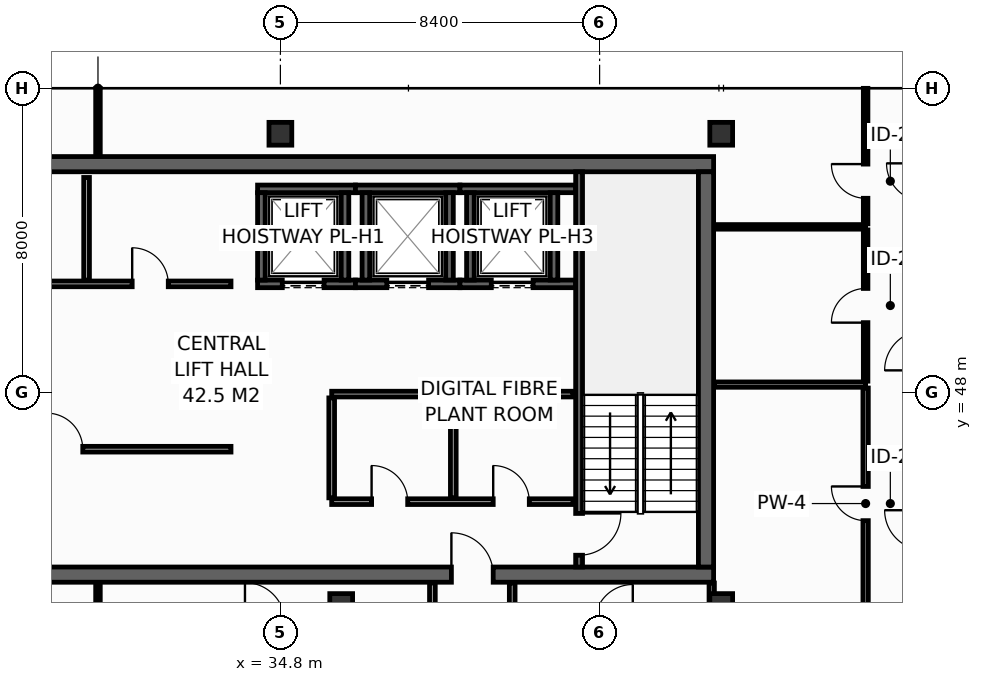
"""IFC4 building model, lengths in metres.
Left out: names, types, materials, properties, quantities, classifications, styles, units other than length and angle.
Written with IfcOpenShell. Run it as: python <this file> out.ifc"""

import sys

from ifc_helpers import new_model, si_unit, direction, frame, frame_2d, origin, origin_2d, place, context, subcontext, project, spatial, rectangle, hollow_rectangle, extrude, element, fill, save


model = new_model("IFC4")
c1 = context("Model", 3, precision=1e-05, world=origin(), true_north=direction((0.0, 1.0)))
c2 = subcontext(c1, "Body", "Model", "MODEL_VIEW")
j1 = project(units=[si_unit("LENGTHUNIT", "METRE"), si_unit("PLANEANGLEUNIT", "RADIAN")], contexts=[c1])
p1 = place(None, origin())
s1 = spatial("IfcSite", under=j1, at=p1, CompositionType="ELEMENT")
p2 = place(p1, origin())
s2 = spatial("IfcBuilding", under=s1, at=p2, CompositionType="ELEMENT")
p3 = place(p2, frame((0.0, 0.0, 319.2)))
s3 = spatial("IfcBuildingStorey", under=s2, at=p3, CompositionType="ELEMENT", Elevation=319.2)
p4 = place(p3, frame((13.7, 43.2, 0.0), z_axis=(0.0, 0.0, 1.0), x_axis=(1.0, 0.0, 0.0)))
e1 = element("IfcWall", 1, at=p4, inside=s3, PredefinedType="SHEAR", context=c2, shape_type="SweptSolid", body=[
    extrude(rectangle(XDim=32.5, YDim=0.4, at=frame_2d((16.25, 0.0))), origin(), (0.0, 0.0, 1.0), 3.95),
])
p5 = place(p4, frame((5.4, 0.0, 0.0)))
e2 = element("IfcOpeningElement", 2, at=p5, cuts=e1, PredefinedType="OPENING", context=c2, shape_type="SweptSolid", body=[
    extrude(rectangle(XDim=1.1, YDim=2.15, at=frame_2d((0.55, 1.075))), frame((0.0, 0.21, 0.0), z_axis=(0.0, -1.0, 0.0), x_axis=(1.0, 0.0, 0.0)), (0.0, 0.0, 1.0), 0.42),
])
p6 = place(p4, frame((25.6, 0.0, 0.0)))
e3 = element("IfcOpeningElement", 3, at=p6, cuts=e1, PredefinedType="OPENING", context=c2, shape_type="SweptSolid", body=[
    extrude(rectangle(XDim=1.1, YDim=2.15, at=frame_2d((0.55, 1.075))), frame((0.0, 0.21, 0.0), z_axis=(0.0, -1.0, 0.0), x_axis=(1.0, 0.0, 0.0)), (0.0, 0.0, 1.0), 0.42),
])
p7 = place(p3, frame((13.7, 54.0, 0.0), z_axis=(0.0, 0.0, 1.0), x_axis=(1.0, 0.0, 0.0)))
e4 = element("IfcWall", 4, at=p7, inside=s3, PredefinedType="SHEAR", context=c2, shape_type="SweptSolid", body=[
    extrude(rectangle(XDim=32.5, YDim=0.4, at=frame_2d((16.25, 0.0))), origin(), (0.0, 0.0, 1.0), 3.95),
])
p8 = place(p3, frame((46.0, 43.4, 0.0), z_axis=(0.0, 0.0, 1.0), x_axis=(0.0, 1.0, 0.0)))
e5 = element("IfcWall", 5, at=p8, inside=s3, PredefinedType="SHEAR", context=c2, shape_type="SweptSolid", body=[
    extrude(rectangle(XDim=10.4, YDim=0.4, at=frame_2d((5.2, 0.0))), origin(), (0.0, 0.0, 1.0), 3.95),
])
for number, where, z_axis, x_axis in (
    (6, (34.8, 54.8, 0.0), (0.0, 0.0, 1.0), (1.0, 0.0, 0.0)),
    (7, (46.4, 54.8, 0.0), (0.0, 0.0, 1.0), (1.0, 0.0, 0.0)),
    (8, (36.4, 42.4, 0.0), (0.0, 0.0, 1.0), (1.0, 0.0, 0.0)),
    (9, (46.4, 42.4, 0.0), (0.0, 0.0, 1.0), (1.0, 0.0, 0.0)),
):
    element("IfcColumn", number, at=place(p3, frame(where, z_axis=z_axis, x_axis=x_axis)), inside=s3, PredefinedType="COLUMN", context=c2, shape_type="SweptSolid", body=[
        extrude(hollow_rectangle(XDim=0.6, YDim=0.6, WallThickness=0.028, at=origin_2d()), origin(), (0.0, 0.0, 1.0), 4.2),
    ])
p9 = place(p3, frame((34.2, 50.85, 0.0), z_axis=(0.0, 0.0, 1.0), x_axis=(1.0, 0.0, 0.0)))
e10 = element("IfcWall", 10, at=p9, inside=s3, PredefinedType="SHEAR", context=c2, shape_type="SweptSolid", body=[
    extrude(rectangle(XDim=2.575, YDim=0.2, at=frame_2d((1.288, 0.0))), origin(), (0.0, 0.0, 1.0), 3.95),
])
p10 = place(p9, frame((0.65, 0.0, 0.0)))
e11 = element("IfcOpeningElement", 11, at=p10, cuts=e10, PredefinedType="OPENING", context=c2, shape_type="SweptSolid", body=[
    extrude(rectangle(XDim=1.1, YDim=2.2, at=frame_2d((0.55, 1.1))), frame((0.0, 0.11, 0.0), z_axis=(0.0, -1.0, 0.0), x_axis=(1.0, 0.0, 0.0)), (0.0, 0.0, 1.0), 0.22),
])
p11 = place(p3, frame((34.2, 53.35, 0.0), z_axis=(0.0, 0.0, 1.0), x_axis=(1.0, 0.0, 0.0)))
e12 = element("IfcWall", 12, at=p11, inside=s3, PredefinedType="SHEAR", context=c2, shape_type="SweptSolid", body=[
    extrude(rectangle(XDim=2.575, YDim=0.2, at=frame_2d((1.288, 0.0))), origin(), (0.0, 0.0, 1.0), 3.95),
])
for number, where, z_axis, x_axis in (
    (13, (34.3, 50.95, 0.0), (0.0, 0.0, 1.0), (0.0, 1.0, 0.0)),
    (14, (36.5, 50.95, 0.0), (0.0, 0.0, 1.0), (0.0, 1.0, 0.0)),
):
    element("IfcWall", number, at=place(p3, frame(where, z_axis=z_axis, x_axis=x_axis)), inside=s3, PredefinedType="SHEAR", context=c2, shape_type="SweptSolid", body=[
        extrude(rectangle(XDim=2.3, YDim=0.2, at=frame_2d((1.15, 0.0))), origin(), (0.0, 0.0, 1.0), 3.95),
    ])
p12 = place(p3, frame((36.775, 50.85, 0.0), z_axis=(0.0, 0.0, 1.0), x_axis=(1.0, 0.0, 0.0)))
e15 = element("IfcWall", 15, at=p12, inside=s3, PredefinedType="SHEAR", context=c2, shape_type="SweptSolid", body=[
    extrude(rectangle(XDim=2.75, YDim=0.2, at=frame_2d((1.375, 0.0))), origin(), (0.0, 0.0, 1.0), 3.95),
])
p13 = place(p12, frame((0.825, 0.0, 0.0)))
e16 = element("IfcOpeningElement", 16, at=p13, cuts=e15, PredefinedType="OPENING", context=c2, shape_type="SweptSolid", body=[
    extrude(rectangle(XDim=1.1, YDim=2.2, at=frame_2d((0.55, 1.1))), frame((0.0, 0.11, 0.0), z_axis=(0.0, -1.0, 0.0), x_axis=(1.0, 0.0, 0.0)), (0.0, 0.0, 1.0), 0.22),
])
p14 = place(p3, frame((36.775, 53.35, 0.0), z_axis=(0.0, 0.0, 1.0), x_axis=(1.0, 0.0, 0.0)))
e17 = element("IfcWall", 17, at=p14, inside=s3, PredefinedType="SHEAR", context=c2, shape_type="SweptSolid", body=[
    extrude(rectangle(XDim=2.75, YDim=0.2, at=frame_2d((1.375, 0.0))), origin(), (0.0, 0.0, 1.0), 3.95),
])
for number, where, z_axis, x_axis in (
    (18, (37.05, 50.95, 0.0), (0.0, 0.0, 1.0), (0.0, 1.0, 0.0)),
    (19, (39.25, 50.95, 0.0), (0.0, 0.0, 1.0), (0.0, 1.0, 0.0)),
):
    element("IfcWall", number, at=place(p3, frame(where, z_axis=z_axis, x_axis=x_axis)), inside=s3, PredefinedType="SHEAR", context=c2, shape_type="SweptSolid", body=[
        extrude(rectangle(XDim=2.3, YDim=0.2, at=frame_2d((1.15, 0.0))), origin(), (0.0, 0.0, 1.0), 3.95),
    ])
p15 = place(p3, frame((39.525, 50.85, 0.0), z_axis=(0.0, 0.0, 1.0), x_axis=(1.0, 0.0, 0.0)))
e20 = element("IfcWall", 20, at=p15, inside=s3, PredefinedType="SHEAR", context=c2, shape_type="SweptSolid", body=[
    extrude(rectangle(XDim=3.045, YDim=0.2, at=frame_2d((1.522, 0.0))), origin(), (0.0, 0.0, 1.0), 3.95),
])
p16 = place(p15, frame((0.825, 0.0, 0.0)))
e21 = element("IfcOpeningElement", 21, at=p16, cuts=e20, PredefinedType="OPENING", context=c2, shape_type="SweptSolid", body=[
    extrude(rectangle(XDim=1.1, YDim=2.2, at=frame_2d((0.55, 1.1))), frame((0.0, 0.11, 0.0), z_axis=(0.0, -1.0, 0.0), x_axis=(1.0, 0.0, 0.0)), (0.0, 0.0, 1.0), 0.22),
])
p17 = place(p3, frame((39.525, 53.35, 0.0), z_axis=(0.0, 0.0, 1.0), x_axis=(1.0, 0.0, 0.0)))
e22 = element("IfcWall", 22, at=p17, inside=s3, PredefinedType="SHEAR", context=c2, shape_type="SweptSolid", body=[
    extrude(rectangle(XDim=3.045, YDim=0.2, at=frame_2d((1.522, 0.0))), origin(), (0.0, 0.0, 1.0), 3.95),
])
for number, where, z_axis, x_axis in (
    (23, (39.8, 50.95, 0.0), (0.0, 0.0, 1.0), (0.0, 1.0, 0.0)),
    (24, (42.0, 50.95, 0.0), (0.0, 0.0, 1.0), (0.0, 1.0, 0.0)),
):
    element("IfcWall", number, at=place(p3, frame(where, z_axis=z_axis, x_axis=x_axis)), inside=s3, PredefinedType="SHEAR", context=c2, shape_type="SweptSolid", body=[
        extrude(rectangle(XDim=2.3, YDim=0.2, at=frame_2d((1.15, 0.0))), origin(), (0.0, 0.0, 1.0), 3.95),
    ])
p18 = place(p3, frame((42.66, 53.8, 0.0), z_axis=(0.0, 0.0, 1.0), x_axis=(0.0, -1.0, 0.0)))
e25 = element("IfcWall", 25, at=p18, inside=s3, PredefinedType="SHEAR", context=c2, shape_type="SweptSolid", body=[
    extrude(rectangle(XDim=10.4, YDim=0.18, at=frame_2d((5.2, 0.0))), origin(), (0.0, 0.0, 1.0), 3.95),
])
p19 = place(p18, frame((8.99, 0.0, 0.0)))
e26 = element("IfcOpeningElement", 26, at=p19, cuts=e25, PredefinedType="OPENING", context=c2, shape_type="SweptSolid", body=[
    extrude(rectangle(XDim=1.1, YDim=2.15, at=frame_2d((0.55, 1.075))), frame((0.0, 0.1, 0.0), z_axis=(0.0, -1.0, 0.0), x_axis=(1.0, 0.0, 0.0)), (0.0, 0.0, 1.0), 0.2),
])
p20 = place(p3, frame((36.15, 45.12, 0.0), z_axis=(0.0, 0.0, 1.0), x_axis=(1.0, 0.0, 0.0)))
e27 = element("IfcWall", 27, at=p20, inside=s3, PredefinedType="PARTITIONING", context=c2, shape_type="SweptSolid", body=[
    extrude(rectangle(XDim=6.35, YDim=0.15, at=frame_2d((3.175, 0.0))), origin(), (0.0, 0.0, 1.0), 3.95),
])
p21 = place(p20, frame((1.05, 0.0, 0.0)))
e28 = element("IfcOpeningElement", 28, at=p21, cuts=e27, PredefinedType="OPENING", context=c2, shape_type="SweptSolid", body=[
    extrude(rectangle(XDim=0.95, YDim=2.15, at=frame_2d((0.475, 1.075))), frame((0.0, 0.085, 0.0), z_axis=(0.0, -1.0, 0.0), x_axis=(1.0, 0.0, 0.0)), (0.0, 0.0, 1.0), 0.17),
])
p22 = place(p20, frame((4.25, 0.0, 0.0)))
e29 = element("IfcOpeningElement", 29, at=p22, cuts=e27, PredefinedType="OPENING", context=c2, shape_type="SweptSolid", body=[
    extrude(rectangle(XDim=0.95, YDim=2.15, at=frame_2d((0.475, 1.075))), frame((0.0, 0.085, 0.0), z_axis=(0.0, -1.0, 0.0), x_axis=(1.0, 0.0, 0.0)), (0.0, 0.0, 1.0), 0.17),
])
p23 = place(p3, frame((36.15, 47.95, 0.0), z_axis=(0.0, 0.0, 1.0), x_axis=(1.0, 0.0, 0.0)))
e30 = element("IfcWall", 30, at=p23, inside=s3, PredefinedType="PARTITIONING", context=c2, shape_type="SweptSolid", body=[
    extrude(rectangle(XDim=6.35, YDim=0.15, at=frame_2d((3.175, 0.0))), origin(), (0.0, 0.0, 1.0), 3.95),
])
for number, where, z_axis, x_axis in (
    (31, (36.15, 45.22, 0.0), (0.0, 0.0, 1.0), (0.0, 1.0, 0.0)),
    (32, (39.35, 45.22, 0.0), (0.0, 0.0, 1.0), (0.0, 1.0, 0.0)),
):
    element("IfcWall", number, at=place(p3, frame(where, z_axis=z_axis, x_axis=x_axis)), inside=s3, PredefinedType="PARTITIONING", context=c2, shape_type="SweptSolid", body=[
        extrude(rectangle(XDim=2.63, YDim=0.15, at=frame_2d((1.315, 0.0))), origin(), (0.0, 0.0, 1.0), 3.95),
    ])
p24 = place(p3, frame((25.85, 50.85, 0.0), z_axis=(0.0, 0.0, 1.0), x_axis=(1.0, 0.0, 0.0)))
e33 = element("IfcWall", 33, at=p24, inside=s3, PredefinedType="PARTITIONING", context=c2, shape_type="SweptSolid", body=[
    extrude(rectangle(XDim=7.65, YDim=0.15, at=frame_2d((3.825, 0.0))), origin(), (0.0, 0.0, 1.0), 3.95),
])
p25 = place(p24, frame((1.25, 0.0, 0.0)))
e34 = element("IfcOpeningElement", 34, at=p25, cuts=e33, PredefinedType="OPENING", context=c2, shape_type="SweptSolid", body=[
    extrude(rectangle(XDim=0.95, YDim=2.15, at=frame_2d((0.475, 1.075))), frame((0.0, 0.085, 0.0), z_axis=(0.0, -1.0, 0.0), x_axis=(1.0, 0.0, 0.0)), (0.0, 0.0, 1.0), 0.17),
])
p26 = place(p24, frame((5.05, 0.0, 0.0)))
e35 = element("IfcOpeningElement", 35, at=p26, cuts=e33, PredefinedType="OPENING", context=c2, shape_type="SweptSolid", body=[
    extrude(rectangle(XDim=0.95, YDim=2.15, at=frame_2d((0.475, 1.075))), frame((0.0, 0.085, 0.0), z_axis=(0.0, -1.0, 0.0), x_axis=(1.0, 0.0, 0.0)), (0.0, 0.0, 1.0), 0.17),
])
p27 = place(p3, frame((29.7, 50.95, 0.0), z_axis=(0.0, 0.0, 1.0), x_axis=(0.0, 1.0, 0.0)))
e36 = element("IfcWall", 36, at=p27, inside=s3, PredefinedType="PARTITIONING", context=c2, shape_type="SweptSolid", body=[
    extrude(rectangle(XDim=2.7, YDim=0.15, at=frame_2d((1.35, 0.0))), origin(), (0.0, 0.0, 1.0), 3.95),
])
p28 = place(p3, frame((25.85, 46.5, 0.0), z_axis=(0.0, 0.0, 1.0), x_axis=(1.0, 0.0, 0.0)))
e37 = element("IfcWall", 37, at=p28, inside=s3, PredefinedType="PARTITIONING", context=c2, shape_type="SweptSolid", body=[
    extrude(rectangle(XDim=7.65, YDim=0.15, at=frame_2d((3.825, 0.0))), origin(), (0.0, 0.0, 1.0), 3.95),
])
p29 = place(p28, frame((2.8, 0.0, 0.0)))
e38 = element("IfcOpeningElement", 38, at=p29, cuts=e37, PredefinedType="OPENING", context=c2, shape_type="SweptSolid", body=[
    extrude(rectangle(XDim=0.95, YDim=2.15, at=frame_2d((0.475, 1.075))), frame((0.0, 0.085, 0.0), z_axis=(0.0, -1.0, 0.0), x_axis=(1.0, 0.0, 0.0)), (0.0, 0.0, 1.0), 0.17),
])
p30 = place(p3, frame((46.15, 42.03, 0.0), z_axis=(0.0, 0.0, 1.0), x_axis=(0.0, 1.0, 0.0)))
e39 = element("IfcWall", 39, at=p30, inside=s3, PredefinedType="PARTITIONING", context=c2, shape_type="SweptSolid", body=[
    extrude(rectangle(XDim=0.95, YDim=0.14, at=frame_2d((0.475, 0.0))), origin(), (0.0, 0.0, 1.0), 3.95),
])
p31 = place(p3, frame((46.22, 48.2, 0.0), z_axis=(0.0, 0.0, 1.0), x_axis=(1.0, 0.0, 0.0)))
e40 = element("IfcWall", 40, at=p31, inside=s3, PredefinedType="PARTITIONING", context=c2, shape_type="SweptSolid", body=[
    extrude(rectangle(XDim=3.98, YDim=0.14, at=frame_2d((1.99, 0.0))), origin(), (0.0, 0.0, 1.0), 3.95),
])
p32 = place(p3, frame((50.2, 42.03, 0.0), z_axis=(0.0, 0.0, 1.0), x_axis=(0.0, 1.0, 0.0)))
e41 = element("IfcWall", 41, at=p32, inside=s3, PredefinedType="PARTITIONING", context=c2, shape_type="SweptSolid", body=[
    extrude(rectangle(XDim=6.08, YDim=0.14, at=frame_2d((3.04, 0.0))), origin(), (0.0, 0.0, 1.0), 3.347),
])
p33 = place(p32, frame((2.59, 0.0, 0.0)))
e42 = element("IfcOpeningElement", 42, at=p33, cuts=e41, PredefinedType="OPENING", context=c2, shape_type="SweptSolid", body=[
    extrude(rectangle(XDim=0.9, YDim=2.1, at=frame_2d((0.45, 1.05))), frame((0.0, 0.08, 0.0), z_axis=(0.0, -1.0, 0.0), x_axis=(1.0, 0.0, 0.0)), (0.0, 0.0, 1.0), 0.16),
])
p34 = place(p3, frame((46.22, 52.35, 0.0), z_axis=(0.0, 0.0, 1.0), x_axis=(1.0, 0.0, 0.0)))
e43 = element("IfcWall", 43, at=p34, inside=s3, PredefinedType="PARTITIONING", context=c2, shape_type="SweptSolid", body=[
    extrude(rectangle(XDim=3.98, YDim=0.12, at=frame_2d((1.99, 0.0))), origin(), (0.0, 0.0, 1.0), 3.95),
])
p35 = place(p3, frame((30.0, 54.22, 0.0), z_axis=(0.0, 0.0, 1.0), x_axis=(0.0, 1.0, 0.0)))
e44 = element("IfcWall", 44, at=p35, inside=s3, PredefinedType="PARTITIONING", context=c2, shape_type="SweptSolid", body=[
    extrude(rectangle(XDim=1.775, YDim=0.12, at=frame_2d((0.888, 0.0))), origin(), (0.0, 0.0, 1.0), 3.335),
])
p36 = place(p3, frame((50.2, 48.29, 0.0), z_axis=(0.0, 0.0, 1.0), x_axis=(0.0, 1.0, 0.0)))
e45 = element("IfcWall", 45, at=p36, inside=s3, PredefinedType="PARTITIONING", context=c2, shape_type="SweptSolid", body=[
    extrude(rectangle(XDim=3.98, YDim=0.12, at=frame_2d((1.99, 0.0))), origin(), (0.0, 0.0, 1.0), 3.95),
])
p37 = place(p36, frame((1.54, 0.0, 0.0)))
e46 = element("IfcOpeningElement", 46, at=p37, cuts=e45, PredefinedType="OPENING", context=c2, shape_type="SweptSolid", body=[
    extrude(rectangle(XDim=0.9, YDim=2.1, at=frame_2d((0.45, 1.05))), frame((0.0, 0.07, 0.0), z_axis=(0.0, -1.0, 0.0), x_axis=(1.0, 0.0, 0.0)), (0.0, 0.0, 1.0), 0.14),
])
p38 = place(p3, frame((50.2, 52.43, 0.0), z_axis=(0.0, 0.0, 1.0), x_axis=(0.0, 1.0, 0.0)))
e47 = element("IfcWall", 47, at=p38, inside=s3, PredefinedType="PARTITIONING", context=c2, shape_type="SweptSolid", body=[
    extrude(rectangle(XDim=3.565, YDim=0.12, at=frame_2d((1.783, 0.0))), origin(), (0.0, 0.0, 1.0), 3.335),
])
p39 = place(p38, frame((0.672, 0.0, 0.0)))
e48 = element("IfcOpeningElement", 48, at=p39, cuts=e47, PredefinedType="OPENING", context=c2, shape_type="SweptSolid", body=[
    extrude(rectangle(XDim=0.9, YDim=2.1, at=frame_2d((0.45, 1.05))), frame((0.0, 0.07, 0.0), z_axis=(0.0, -1.0, 0.0), x_axis=(1.0, 0.0, 0.0)), (0.0, 0.0, 1.0), 0.14),
])
for number, where, z_axis, x_axis in (
    (49, (38.8, 41.94, 0.0), (0.0, 0.0, 1.0), (0.0, 1.0, 0.0)),
    (50, (40.9, 41.94, 0.0), (0.0, 0.0, 1.0), (0.0, 1.0, 0.0)),
):
    element("IfcWall", number, at=place(p3, frame(where, z_axis=z_axis, x_axis=x_axis)), inside=s3, PredefinedType="PARTITIONING", context=c2, shape_type="SweptSolid", body=[
        extrude(rectangle(XDim=1.04, YDim=0.15, at=frame_2d((0.52, 0.0))), origin(), (0.0, 0.0, 1.0), 3.95),
    ])
p40 = place(p3, frame((30.0, 41.94, 0.0), z_axis=(0.0, 0.0, 1.0), x_axis=(0.0, 1.0, 0.0)))
e51 = element("IfcWall", 51, at=p40, inside=s3, PredefinedType="PARTITIONING", context=c2, shape_type="SweptSolid", body=[
    extrude(rectangle(XDim=1.04, YDim=0.12, at=frame_2d((0.52, 0.0))), origin(), (0.0, 0.0, 1.0), 3.347),
])
p41 = place(p10, origin())
e52 = element("IfcDoor", 52, at=p41, inside=s3, OperationType="SLIDING_TO_LEFT", PredefinedType="DOOR", context=c2, shape_type="SweptSolid", body=[
    extrude(rectangle(XDim=1.1, YDim=2.2, at=frame_2d((0.55, 1.1))), frame((0.0, 0.025, 0.0), z_axis=(0.0, -1.0, 0.0), x_axis=(1.0, 0.0, 0.0)), (0.0, 0.0, 1.0), 0.05),
])
fill(e11, e52)
p42 = place(p13, origin())
e53 = element("IfcDoor", 53, at=p42, inside=s3, OperationType="SLIDING_TO_LEFT", PredefinedType="DOOR", context=c2, shape_type="SweptSolid", body=[
    extrude(rectangle(XDim=1.1, YDim=2.2, at=frame_2d((0.55, 1.1))), frame((0.0, 0.025, 0.0), z_axis=(0.0, -1.0, 0.0), x_axis=(1.0, 0.0, 0.0)), (0.0, 0.0, 1.0), 0.05),
])
fill(e16, e53)
p43 = place(p16, origin())
e54 = element("IfcDoor", 54, at=p43, inside=s3, OperationType="SLIDING_TO_LEFT", PredefinedType="DOOR", context=c2, shape_type="SweptSolid", body=[
    extrude(rectangle(XDim=1.1, YDim=2.2, at=frame_2d((0.55, 1.1))), frame((0.0, 0.025, 0.0), z_axis=(0.0, -1.0, 0.0), x_axis=(1.0, 0.0, 0.0)), (0.0, 0.0, 1.0), 0.05),
])
fill(e21, e54)
p44 = place(p19, origin())
e55 = element("IfcDoor", 55, at=p44, inside=s3, OperationType="SINGLE_SWING_LEFT", PredefinedType="DOOR", context=c2, shape_type="SweptSolid", body=[
    extrude(rectangle(XDim=1.1, YDim=2.15, at=frame_2d((0.55, 1.075))), frame((0.0, 0.025, 0.0), z_axis=(0.0, -1.0, 0.0), x_axis=(1.0, 0.0, 0.0)), (0.0, 0.0, 1.0), 0.05),
])
fill(e26, e55)
p45 = place(p6, origin())
e56 = element("IfcDoor", 56, at=p45, inside=s3, OperationType="SINGLE_SWING_LEFT", PredefinedType="DOOR", context=c2, shape_type="SweptSolid", body=[
    extrude(rectangle(XDim=1.1, YDim=2.15, at=frame_2d((0.55, 1.075))), frame((0.0, 0.025, 0.0), z_axis=(0.0, -1.0, 0.0), x_axis=(1.0, 0.0, 0.0)), (0.0, 0.0, 1.0), 0.05),
])
fill(e3, e56)
p46 = place(p21, origin())
e57 = element("IfcDoor", 57, at=p46, inside=s3, OperationType="SINGLE_SWING_LEFT", PredefinedType="DOOR", context=c2, shape_type="SweptSolid", body=[
    extrude(rectangle(XDim=0.95, YDim=2.15, at=frame_2d((0.475, 1.075))), frame((0.0, 0.025, 0.0), z_axis=(0.0, -1.0, 0.0), x_axis=(1.0, 0.0, 0.0)), (0.0, 0.0, 1.0), 0.05),
])
fill(e28, e57)
p47 = place(p22, origin())
e58 = element("IfcDoor", 58, at=p47, inside=s3, OperationType="SINGLE_SWING_LEFT", PredefinedType="DOOR", context=c2, shape_type="SweptSolid", body=[
    extrude(rectangle(XDim=0.95, YDim=2.15, at=frame_2d((0.475, 1.075))), frame((0.0, 0.025, 0.0), z_axis=(0.0, -1.0, 0.0), x_axis=(1.0, 0.0, 0.0)), (0.0, 0.0, 1.0), 0.05),
])
fill(e29, e58)
p48 = place(p26, origin())
e59 = element("IfcDoor", 59, at=p48, inside=s3, OperationType="SINGLE_SWING_LEFT", PredefinedType="DOOR", context=c2, shape_type="SweptSolid", body=[
    extrude(rectangle(XDim=0.95, YDim=2.15, at=frame_2d((0.475, 1.075))), frame((0.0, 0.025, 0.0), z_axis=(0.0, -1.0, 0.0), x_axis=(1.0, 0.0, 0.0)), (0.0, 0.0, 1.0), 0.05),
])
fill(e35, e59)
p49 = place(p29, origin())
e60 = element("IfcDoor", 60, at=p49, inside=s3, OperationType="SINGLE_SWING_LEFT", PredefinedType="DOOR", context=c2, shape_type="SweptSolid", body=[
    extrude(rectangle(XDim=0.95, YDim=2.15, at=frame_2d((0.475, 1.075))), frame((0.0, 0.025, 0.0), z_axis=(0.0, -1.0, 0.0), x_axis=(1.0, 0.0, 0.0)), (0.0, 0.0, 1.0), 0.05),
])
fill(e38, e60)
p50 = place(p33, origin())
e61 = element("IfcDoor", 61, at=p50, inside=s3, OperationType="SINGLE_SWING_RIGHT", PredefinedType="DOOR", context=c2, shape_type="SweptSolid", body=[
    extrude(rectangle(XDim=0.9, YDim=2.1, at=frame_2d((0.45, 1.05))), frame((0.0, 0.025, 0.0), z_axis=(0.0, -1.0, 0.0), x_axis=(1.0, 0.0, 0.0)), (0.0, 0.0, 1.0), 0.05),
])
fill(e42, e61)
p51 = place(p37, origin())
e62 = element("IfcDoor", 62, at=p51, inside=s3, OperationType="SINGLE_SWING_LEFT", PredefinedType="DOOR", context=c2, shape_type="SweptSolid", body=[
    extrude(rectangle(XDim=0.9, YDim=2.1, at=frame_2d((0.45, 1.05))), frame((0.0, 0.025, 0.0), z_axis=(0.0, -1.0, 0.0), x_axis=(1.0, 0.0, 0.0)), (0.0, 0.0, 1.0), 0.05),
])
fill(e46, e62)
p52 = place(p39, origin())
e63 = element("IfcDoor", 63, at=p52, inside=s3, OperationType="SINGLE_SWING_RIGHT", PredefinedType="DOOR", context=c2, shape_type="SweptSolid", body=[
    extrude(rectangle(XDim=0.9, YDim=2.1, at=frame_2d((0.45, 1.05))), frame((0.0, 0.025, 0.0), z_axis=(0.0, -1.0, 0.0), x_axis=(1.0, 0.0, 0.0)), (0.0, 0.0, 1.0), 0.05),
])
fill(e48, e63)
save(model, sys.argv[1])
